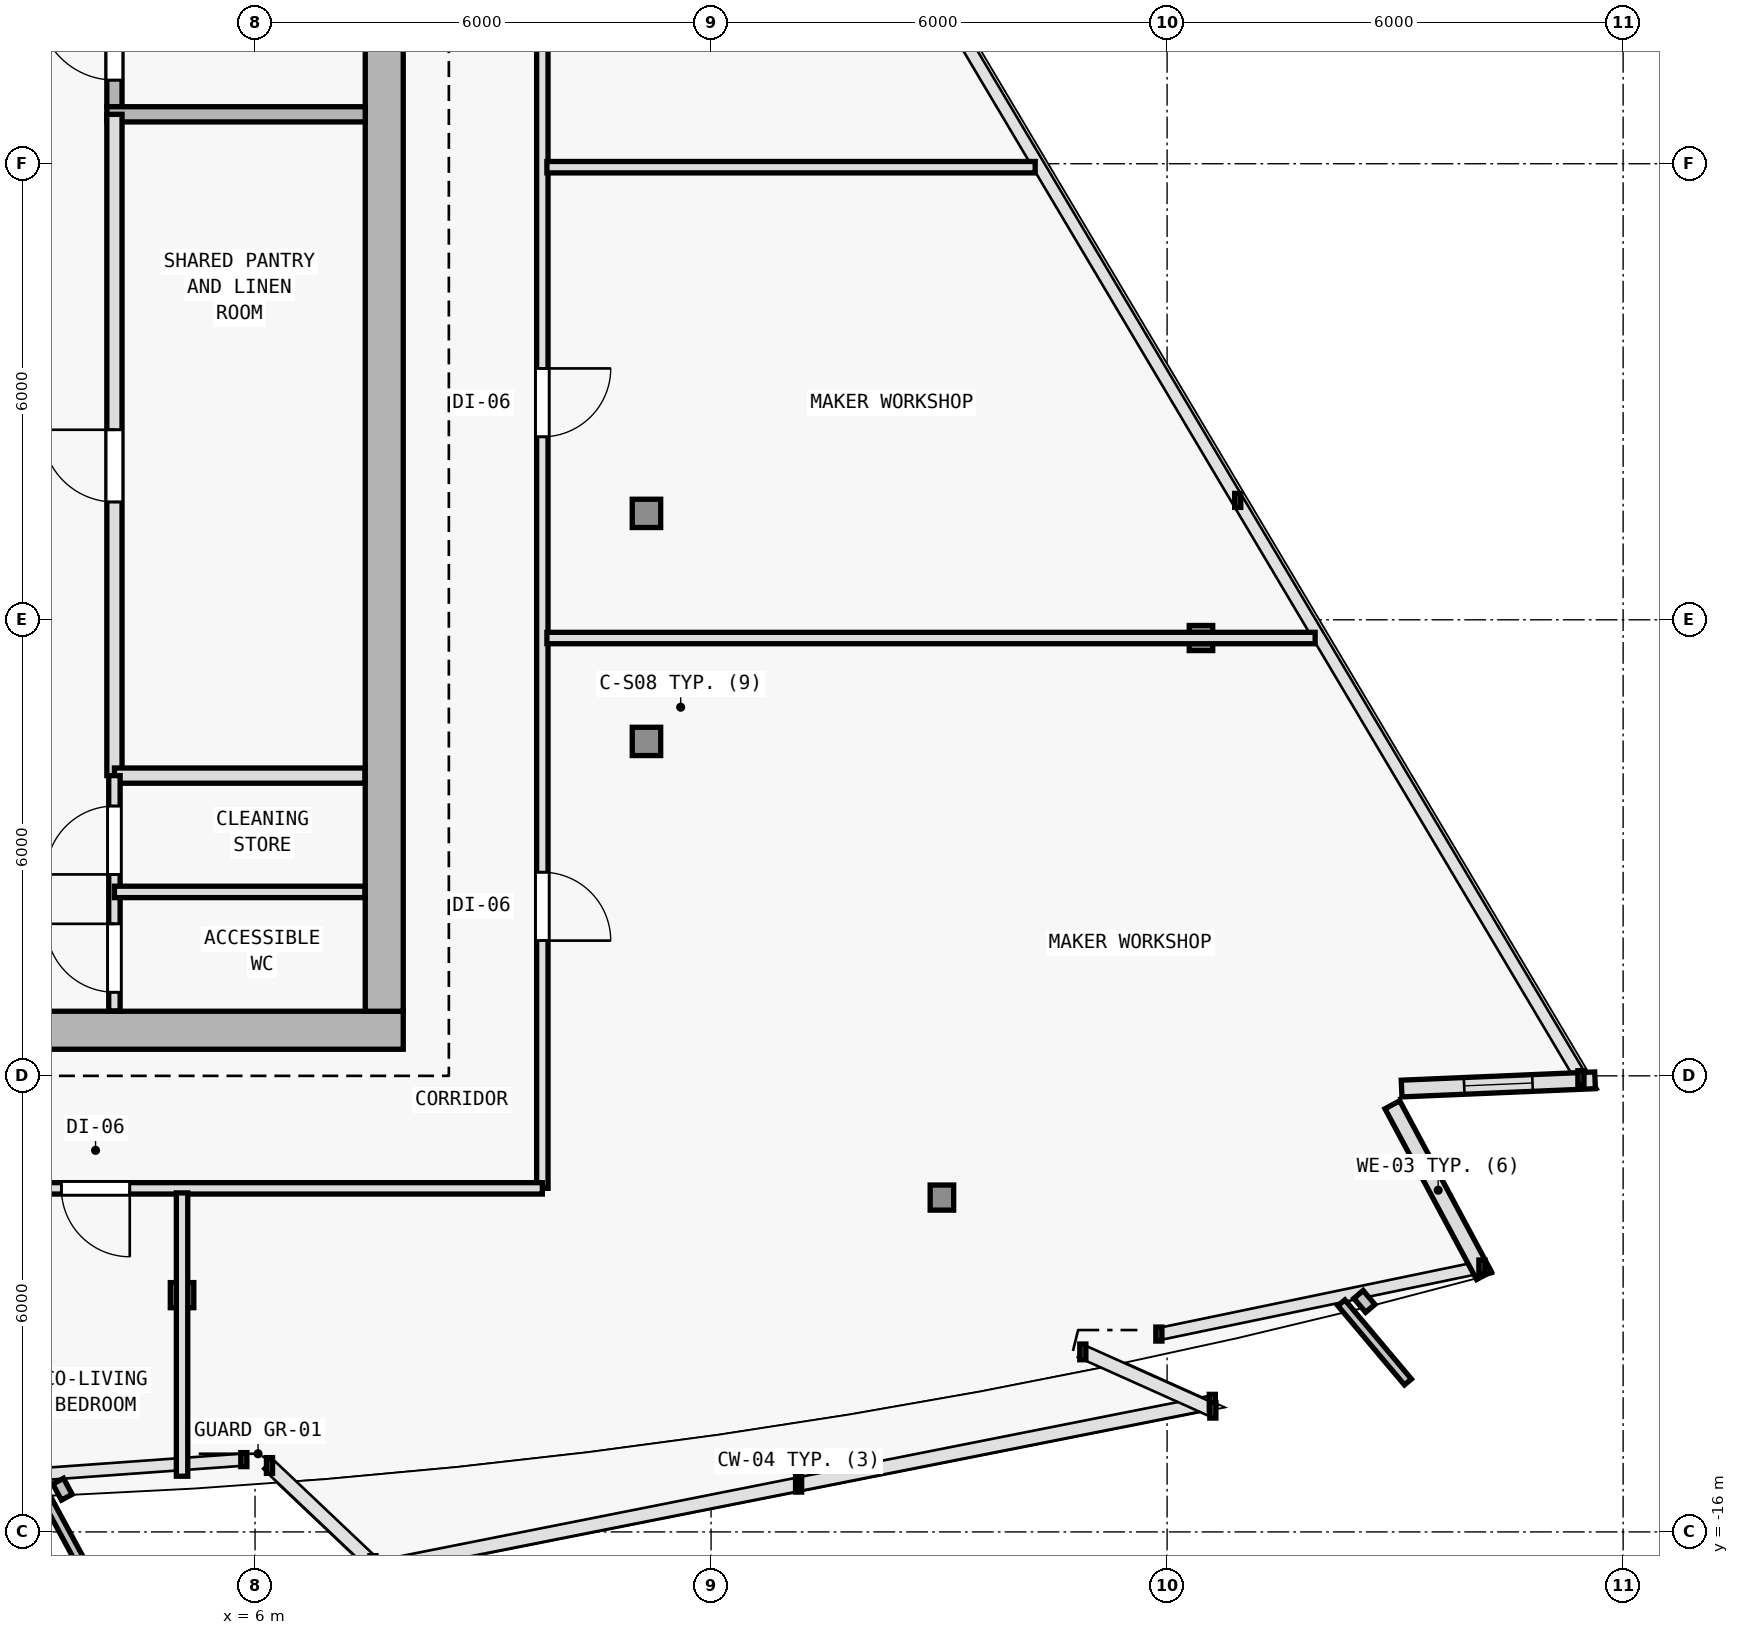
"""IFC4 building model, lengths in metres.
Left out: names, types, materials, properties, quantities, classifications, styles, units other than length and angle.
Written with IfcOpenShell. Run it as: python <this file> out.ifc"""

import sys

from ifc_helpers import new_model, si_unit, direction, frame, frame_2d, origin, origin_2d, place, context, subcontext, project, spatial, rectangle, i_section, extrude, element, fill, save


model = new_model("IFC4")
c1 = context("Model", 3, precision=1e-05, world=origin(), true_north=direction((0.0, 1.0)))
c2 = subcontext(c1, "Body", "Model", "MODEL_VIEW")
j1 = project(units=[si_unit("LENGTHUNIT", "METRE"), si_unit("PLANEANGLEUNIT", "RADIAN")], contexts=[c1])
p1 = place(None, origin())
s1 = spatial("IfcSite", under=j1, at=p1, CompositionType="ELEMENT")
p2 = place(p1, origin())
s2 = spatial("IfcBuilding", under=s1, at=p2, CompositionType="ELEMENT")
p3 = place(p2, frame((0.0, 0.0, 294.0)))
s3 = spatial("IfcBuildingStorey", under=s2, at=p3, CompositionType="ELEMENT", Elevation=294.0)
for number, where, z_axis, x_axis in (
    (1, (7.7, -9.4, 0.0), (0.0, 0.0, 1.0), (1.0, 0.0, 0.0)),
    (2, (7.7, 0.4, 0.0), (0.0, 0.0, 1.0), (1.0, 0.0, 0.0)),
):
    element("IfcColumn", number, at=place(p3, frame(where, z_axis=z_axis, x_axis=x_axis)), inside=s3, PredefinedType="COLUMN", context=c2, shape_type="SweptSolid", body=[
        extrude(i_section(OverallWidth=0.374, OverallDepth=0.372, WebThickness=0.012, FlangeThickness=0.02, FilletRadius=0.015, at=origin_2d()), origin(), (0.0, 0.0, 1.0), 3.6),
    ])
for number, where, z_axis, x_axis in (
    (3, (5.04, -12.885, 0.006), (0.0, 0.0, 1.0), (1.0, 0.0, 0.0)),
    (4, (15.037, -11.602, 0.006), (0.0, 0.0, 1.0), (1.0, 0.0, 0.0)),
    (5, (18.446, -4.24, 0.006), (0.0, 0.0, 1.0), (1.0, 0.0, 0.0)),
):
    element("IfcColumn", number, at=place(p3, frame(where, z_axis=z_axis, x_axis=x_axis)), inside=s3, PredefinedType="COLUMN", context=c2, shape_type="SweptSolid", body=[
        extrude(i_section(OverallWidth=0.309, OverallDepth=0.33, WebThickness=0.011, FlangeThickness=0.019, FilletRadius=0.027, at=origin_2d()), origin(), (0.0, 0.0, 1.0), 3.594),
    ])
for number, where, z_axis, x_axis in (
    (6, (11.15, -5.6, 0.0), (0.0, 0.0, 1.0), (1.0, 0.0, 0.0)),
    (7, (11.15, -2.6, 0.0), (0.0, 0.0, 1.0), (1.0, 0.0, 0.0)),
):
    element("IfcColumn", number, at=place(p3, frame(where, z_axis=z_axis, x_axis=x_axis)), inside=s3, PredefinedType="COLUMN", context=c2, shape_type="SweptSolid", body=[
        extrude(i_section(OverallWidth=0.374, OverallDepth=0.372, WebThickness=0.012, FlangeThickness=0.02, FilletRadius=0.015, at=origin_2d()), origin(), (0.0, 0.0, 1.0), 3.6),
    ])
p4 = place(p3, frame((20.964, -10.381, 0.0), z_axis=(0.0, 0.0, 1.0), x_axis=(0.472728849632, -0.881207940685, 0.0)))
e8 = element("IfcWall", 8, at=p4, inside=s3, PredefinedType="SOLIDWALL", context=c2, shape_type="SweptSolid", body=[
    extrude(rectangle(XDim=2.55, YDim=0.22, at=frame_2d((1.275, 0.0))), origin(), (0.0, 0.0, 1.0), 3.34),
])
p5 = place(p3, frame((23.631, -10.059, 0.0), z_axis=(0.0, 0.0, 1.0), x_axis=(-0.999098350703, -0.042455690107, 0.0)))
e9 = element("IfcWall", 9, at=p5, inside=s3, PredefinedType="SOLIDWALL", context=c2, shape_type="SweptSolid", body=[
    extrude(rectangle(XDim=2.547, YDim=0.22, at=frame_2d((1.274, 0.0))), origin(), (0.0, 0.0, 1.0), 3.34),
])
p6 = place(p5, frame((0.824, 0.0, 0.62)))
e10 = element("IfcOpeningElement", 10, at=p6, cuts=e9, PredefinedType="OPENING", context=c2, shape_type="SweptSolid", body=[
    extrude(rectangle(XDim=0.9, YDim=1.6, at=frame_2d((0.45, 0.8))), frame((0.0, 0.12, 0.0), z_axis=(0.0, -1.0, 0.0), x_axis=(1.0, 0.0, 0.0)), (0.0, 0.0, 1.0), 0.24),
])
p7 = place(p3, frame((-7.95, -9.4, 0.0), z_axis=(0.0, 0.0, 1.0), x_axis=(1.0, 0.0, 0.0)))
e11 = element("IfcWall", 11, at=p7, inside=s3, PredefinedType="SHEAR", context=c2, shape_type="SweptSolid", body=[
    extrude(rectangle(XDim=15.9, YDim=0.5, at=frame_2d((7.95, 0.0))), origin(), (0.0, 0.0, 1.0), 3.34),
])
p8 = place(p7, frame((9.6, 0.0, 0.0)))
e12 = element("IfcOpeningElement", 12, at=p8, cuts=e11, PredefinedType="OPENING", context=c2, shape_type="SweptSolid", body=[
    extrude(rectangle(XDim=1.5, YDim=2.2, at=frame_2d((0.75, 1.1))), frame((0.0, 0.26, 0.0), z_axis=(0.0, -1.0, 0.0), x_axis=(1.0, 0.0, 0.0)), (0.0, 0.0, 1.0), 0.52),
])
p9 = place(p3, frame((7.7, 9.95, 0.0), z_axis=(0.0, 0.0, 1.0), x_axis=(0.0, -1.0, 0.0)))
e13 = element("IfcWall", 13, at=p9, inside=s3, PredefinedType="SHEAR", context=c2, shape_type="SweptSolid", body=[
    extrude(rectangle(XDim=19.1, YDim=0.5, at=frame_2d((9.55, 0.0))), origin(), (0.0, 0.0, 1.0), 3.34),
])
p10 = place(p3, frame((4.15, 2.75, 0.0), z_axis=(0.0, 0.0, 1.0), x_axis=(0.0, 1.0, 0.0)))
e14 = element("IfcWall", 14, at=p10, inside=s3, PredefinedType="SOLIDWALL", context=c2, shape_type="SweptSolid", body=[
    extrude(rectangle(XDim=7.2, YDim=0.2, at=frame_2d((3.6, 0.0))), origin(), (0.0, 0.0, 1.0), 3.34),
])
p11 = place(p10, frame((0.35, 0.0, 0.0)))
e15 = element("IfcOpeningElement", 15, at=p11, cuts=e14, PredefinedType="OPENING", context=c2, shape_type="SweptSolid", body=[
    extrude(rectangle(XDim=1.0, YDim=2.15, at=frame_2d((0.5, 1.075))), frame((0.0, 0.11, 0.0), z_axis=(0.0, -1.0, 0.0), x_axis=(1.0, 0.0, 0.0)), (0.0, 0.0, 1.0), 0.22),
])
p12 = place(p3, frame((4.05, 2.65, 0.0), z_axis=(0.0, 0.0, 1.0), x_axis=(1.0, 0.0, 0.0)))
e16 = element("IfcWall", 16, at=p12, inside=s3, PredefinedType="SOLIDWALL", context=c2, shape_type="SweptSolid", body=[
    extrude(rectangle(XDim=3.4, YDim=0.2, at=frame_2d((1.7, 0.0))), origin(), (0.0, 0.0, 1.0), 3.34),
])
p13 = place(p3, frame((4.15, -6.05, 0.0), z_axis=(0.0, 0.0, 1.0), x_axis=(0.0, 1.0, 0.0)))
e17 = element("IfcWall", 17, at=p13, inside=s3, PredefinedType="SOLIDWALL", context=c2, shape_type="SweptSolid", body=[
    extrude(rectangle(XDim=8.7, YDim=0.2, at=frame_2d((4.35, 0.0))), origin(), (0.0, 0.0, 1.0), 3.34),
])
p14 = place(p13, frame((3.6, 0.0, 0.0)))
e18 = element("IfcOpeningElement", 18, at=p14, cuts=e17, PredefinedType="OPENING", context=c2, shape_type="SweptSolid", body=[
    extrude(rectangle(XDim=0.95, YDim=2.1, at=frame_2d((0.475, 1.05))), frame((0.0, 0.11, 0.0), z_axis=(0.0, -1.0, 0.0), x_axis=(1.0, 0.0, 0.0)), (0.0, 0.0, 1.0), 0.22),
])
p15 = place(p3, frame((4.15, -6.05, 0.0), z_axis=(0.0, 0.0, 1.0), x_axis=(1.0, 0.0, 0.0)))
e19 = element("IfcWall", 19, at=p15, inside=s3, PredefinedType="SOLIDWALL", context=c2, shape_type="SweptSolid", body=[
    extrude(rectangle(XDim=3.295, YDim=0.2, at=frame_2d((1.647, 0.0))), origin(), (0.0, 0.0, 1.0), 3.34),
])
p16 = place(p3, frame((4.15, -9.145, 0.0), z_axis=(0.0, 0.0, 1.0), x_axis=(0.0, 1.0, 0.0)))
e20 = element("IfcWall", 20, at=p16, inside=s3, PredefinedType="PARTITIONING", context=c2, shape_type="SweptSolid", body=[
    extrude(rectangle(XDim=3.095, YDim=0.15, at=frame_2d((1.547, 0.0))), origin(), (0.0, 0.0, 1.0), 3.34),
])
p17 = place(p16, frame((0.245, 0.0, 0.0)))
e21 = element("IfcOpeningElement", 21, at=p17, cuts=e20, PredefinedType="OPENING", context=c2, shape_type="SweptSolid", body=[
    extrude(rectangle(XDim=0.9, YDim=2.1, at=frame_2d((0.45, 1.05))), frame((0.0, 0.085, 0.0), z_axis=(0.0, -1.0, 0.0), x_axis=(1.0, 0.0, 0.0)), (0.0, 0.0, 1.0), 0.17),
])
p18 = place(p16, frame((1.795, 0.0, 0.0)))
e22 = element("IfcOpeningElement", 22, at=p18, cuts=e20, PredefinedType="OPENING", context=c2, shape_type="SweptSolid", body=[
    extrude(rectangle(XDim=0.9, YDim=2.1, at=frame_2d((0.45, 1.05))), frame((0.0, 0.085, 0.0), z_axis=(0.0, -1.0, 0.0), x_axis=(1.0, 0.0, 0.0)), (0.0, 0.0, 1.0), 0.17),
])
p19 = place(p3, frame((4.15, -7.58, 0.0), z_axis=(0.0, 0.0, 1.0), x_axis=(1.0, 0.0, 0.0)))
e23 = element("IfcWall", 23, at=p19, inside=s3, PredefinedType="PARTITIONING", context=c2, shape_type="SweptSolid", body=[
    extrude(rectangle(XDim=3.295, YDim=0.15, at=frame_2d((1.647, 0.0))), origin(), (0.0, 0.0, 1.0), 3.34),
])
p20 = place(p3, frame((9.78, 8.226, 0.0), z_axis=(0.0, 0.0, 1.0), x_axis=(0.0, -1.0, 0.0)))
e24 = element("IfcWall", 24, at=p20, inside=s3, PredefinedType="PARTITIONING", context=c2, shape_type="SweptSolid", body=[
    extrude(rectangle(XDim=19.706, YDim=0.15, at=frame_2d((9.853, 0.0))), origin(), (0.0, 0.0, 1.0), 2.765),
])
p21 = place(p20, frame((15.547, 0.0, 0.0)))
e25 = element("IfcOpeningElement", 25, at=p21, cuts=e24, PredefinedType="OPENING", context=c2, shape_type="SweptSolid", body=[
    extrude(rectangle(XDim=0.9, YDim=2.1, at=frame_2d((0.45, 1.05))), frame((0.0, 0.085, 0.0), z_axis=(0.0, -1.0, 0.0), x_axis=(1.0, 0.0, 0.0)), (0.0, 0.0, 1.0), 0.17),
])
p22 = place(p20, frame((8.919, 0.0, 0.0)))
e26 = element("IfcOpeningElement", 26, at=p22, cuts=e24, PredefinedType="OPENING", context=c2, shape_type="SweptSolid", body=[
    extrude(rectangle(XDim=0.9, YDim=2.1, at=frame_2d((0.45, 1.05))), frame((0.0, 0.085, 0.0), z_axis=(0.0, -1.0, 0.0), x_axis=(1.0, 0.0, 0.0)), (0.0, 0.0, 1.0), 0.17),
])
p23 = place(p20, frame((2.775, 0.0, 0.0)))
e27 = element("IfcOpeningElement", 27, at=p23, cuts=e24, PredefinedType="OPENING", context=c2, shape_type="SweptSolid", body=[
    extrude(rectangle(XDim=0.9, YDim=2.1, at=frame_2d((0.45, 1.05))), frame((0.0, 0.085, 0.0), z_axis=(0.0, -1.0, 0.0), x_axis=(1.0, 0.0, 0.0)), (0.0, 0.0, 1.0), 0.17),
])
p24 = place(p3, frame((9.78, -11.48, 0.0), z_axis=(0.0, 0.0, 1.0), x_axis=(-1.0, 0.0, 0.0)))
e28 = element("IfcWall", 28, at=p24, inside=s3, PredefinedType="PARTITIONING", context=c2, shape_type="SweptSolid", body=[
    extrude(rectangle(XDim=19.56, YDim=0.15, at=frame_2d((9.78, 0.0))), origin(), (0.0, 0.0, 1.0), 2.715),
])
p25 = place(p24, frame((16.651, 0.0, 0.0)))
e29 = element("IfcOpeningElement", 29, at=p25, cuts=e28, PredefinedType="OPENING", context=c2, shape_type="SweptSolid", body=[
    extrude(rectangle(XDim=0.9, YDim=2.1, at=frame_2d((0.45, 1.05))), frame((0.0, 0.085, 0.0), z_axis=(0.0, -1.0, 0.0), x_axis=(1.0, 0.0, 0.0)), (0.0, 0.0, 1.0), 0.17),
])
p26 = place(p24, frame((12.823, 0.0, 0.0)))
e30 = element("IfcOpeningElement", 30, at=p26, cuts=e28, PredefinedType="OPENING", context=c2, shape_type="SweptSolid", body=[
    extrude(rectangle(XDim=0.9, YDim=2.1, at=frame_2d((0.45, 1.05))), frame((0.0, 0.085, 0.0), z_axis=(0.0, -1.0, 0.0), x_axis=(1.0, 0.0, 0.0)), (0.0, 0.0, 1.0), 0.17),
])
p27 = place(p24, frame((10.222, 0.0, 0.0)))
e31 = element("IfcOpeningElement", 31, at=p27, cuts=e28, PredefinedType="OPENING", context=c2, shape_type="SweptSolid", body=[
    extrude(rectangle(XDim=0.9, YDim=2.1, at=frame_2d((0.45, 1.05))), frame((0.0, 0.085, 0.0), z_axis=(0.0, -1.0, 0.0), x_axis=(1.0, 0.0, 0.0)), (0.0, 0.0, 1.0), 0.17),
])
p28 = place(p24, frame((7.867, 0.0, 0.0)))
e32 = element("IfcOpeningElement", 32, at=p28, cuts=e28, PredefinedType="OPENING", context=c2, shape_type="SweptSolid", body=[
    extrude(rectangle(XDim=0.9, YDim=2.1, at=frame_2d((0.45, 1.05))), frame((0.0, 0.085, 0.0), z_axis=(0.0, -1.0, 0.0), x_axis=(1.0, 0.0, 0.0)), (0.0, 0.0, 1.0), 0.17),
])
p29 = place(p24, frame((5.428, 0.0, 0.0)))
e33 = element("IfcOpeningElement", 33, at=p29, cuts=e28, PredefinedType="OPENING", context=c2, shape_type="SweptSolid", body=[
    extrude(rectangle(XDim=0.9, YDim=2.1, at=frame_2d((0.45, 1.05))), frame((0.0, 0.085, 0.0), z_axis=(0.0, -1.0, 0.0), x_axis=(1.0, 0.0, 0.0)), (0.0, 0.0, 1.0), 0.17),
])
p30 = place(p3, frame((5.04, -11.54, 0.0), z_axis=(0.0, 0.0, 1.0), x_axis=(0.0, -1.0, 0.0)))
e34 = element("IfcWall", 34, at=p30, inside=s3, PredefinedType="PARTITIONING", context=c2, shape_type="SweptSolid", body=[
    extrude(rectangle(XDim=3.727, YDim=0.15, at=frame_2d((1.864, 0.0))), origin(), (0.0, 0.0, 1.0), 2.765),
])
p31 = place(p3, frame((9.84, -4.24, 0.0), z_axis=(0.0, 0.0, 1.0), x_axis=(1.0, 0.0, 0.0)))
e35 = element("IfcWall", 35, at=p31, inside=s3, PredefinedType="PARTITIONING", context=c2, shape_type="SweptSolid", body=[
    extrude(rectangle(XDim=10.107, YDim=0.15, at=frame_2d((5.054, 0.0))), origin(), (0.0, 0.0, 1.0), 2.865),
])
p32 = place(p3, frame((9.84, 1.954, 0.0), z_axis=(0.0, 0.0, 1.0), x_axis=(1.0, 0.0, 0.0)))
e36 = element("IfcWall", 36, at=p32, inside=s3, PredefinedType="PARTITIONING", context=c2, shape_type="SweptSolid", body=[
    extrude(rectangle(XDim=6.424, YDim=0.15, at=frame_2d((3.212, 0.0))), origin(), (0.0, 0.0, 1.0), 2.865),
])
p33 = place(p6, origin())
e37 = element("IfcWindow", 37, at=p33, inside=s3, PartitioningType="SINGLE_PANEL", PredefinedType="WINDOW", context=c2, shape_type="SweptSolid", body=[
    extrude(rectangle(XDim=0.9, YDim=1.6, at=frame_2d((0.45, 0.8))), frame((0.0, 0.03, 0.0), z_axis=(0.0, -1.0, 0.0), x_axis=(1.0, 0.0, 0.0)), (0.0, 0.0, 1.0), 0.06),
])
fill(e10, e37)
p34 = place(p11, origin())
e38 = element("IfcDoor", 38, at=p34, inside=s3, OperationType="SINGLE_SWING_RIGHT", PredefinedType="DOOR", context=c2, shape_type="SweptSolid", body=[
    extrude(rectangle(XDim=1.0, YDim=2.15, at=frame_2d((0.5, 1.075))), frame((0.0, 0.025, 0.0), z_axis=(0.0, -1.0, 0.0), x_axis=(1.0, 0.0, 0.0)), (0.0, 0.0, 1.0), 0.05),
])
fill(e15, e38)
p35 = place(p14, origin())
e39 = element("IfcDoor", 39, at=p35, inside=s3, OperationType="SINGLE_SWING_RIGHT", PredefinedType="DOOR", context=c2, shape_type="SweptSolid", body=[
    extrude(rectangle(XDim=0.95, YDim=2.1, at=frame_2d((0.475, 1.05))), frame((0.0, 0.025, 0.0), z_axis=(0.0, -1.0, 0.0), x_axis=(1.0, 0.0, 0.0)), (0.0, 0.0, 1.0), 0.05),
])
fill(e18, e39)
p36 = place(p17, origin())
e40 = element("IfcDoor", 40, at=p36, inside=s3, OperationType="SINGLE_SWING_RIGHT", PredefinedType="DOOR", context=c2, shape_type="SweptSolid", body=[
    extrude(rectangle(XDim=0.9, YDim=2.1, at=frame_2d((0.45, 1.05))), frame((0.0, 0.025, 0.0), z_axis=(0.0, -1.0, 0.0), x_axis=(1.0, 0.0, 0.0)), (0.0, 0.0, 1.0), 0.05),
])
fill(e21, e40)
p37 = place(p18, origin())
e41 = element("IfcDoor", 41, at=p37, inside=s3, OperationType="SINGLE_SWING_LEFT", PredefinedType="DOOR", context=c2, shape_type="SweptSolid", body=[
    extrude(rectangle(XDim=0.9, YDim=2.1, at=frame_2d((0.45, 1.05))), frame((0.0, 0.025, 0.0), z_axis=(0.0, -1.0, 0.0), x_axis=(1.0, 0.0, 0.0)), (0.0, 0.0, 1.0), 0.05),
])
fill(e22, e41)
p38 = place(p29, origin())
e42 = element("IfcDoor", 42, at=p38, inside=s3, OperationType="SINGLE_SWING_LEFT", PredefinedType="DOOR", context=c2, shape_type="SweptSolid", body=[
    extrude(rectangle(XDim=0.9, YDim=2.1, at=frame_2d((0.45, 1.05))), frame((0.0, 0.025, 0.0), z_axis=(0.0, -1.0, 0.0), x_axis=(1.0, 0.0, 0.0)), (0.0, 0.0, 1.0), 0.05),
])
fill(e33, e42)
p39 = place(p21, origin())
e43 = element("IfcDoor", 43, at=p39, inside=s3, OperationType="SINGLE_SWING_RIGHT", PredefinedType="DOOR", context=c2, shape_type="SweptSolid", body=[
    extrude(rectangle(XDim=0.9, YDim=2.1, at=frame_2d((0.45, 1.05))), frame((0.0, 0.025, 0.0), z_axis=(0.0, -1.0, 0.0), x_axis=(1.0, 0.0, 0.0)), (0.0, 0.0, 1.0), 0.05),
])
fill(e25, e43)
p40 = place(p22, origin())
e44 = element("IfcDoor", 44, at=p40, inside=s3, OperationType="SINGLE_SWING_LEFT", PredefinedType="DOOR", context=c2, shape_type="SweptSolid", body=[
    extrude(rectangle(XDim=0.9, YDim=2.1, at=frame_2d((0.45, 1.05))), frame((0.0, 0.025, 0.0), z_axis=(0.0, -1.0, 0.0), x_axis=(1.0, 0.0, 0.0)), (0.0, 0.0, 1.0), 0.05),
])
fill(e26, e44)
save(model, sys.argv[1])
